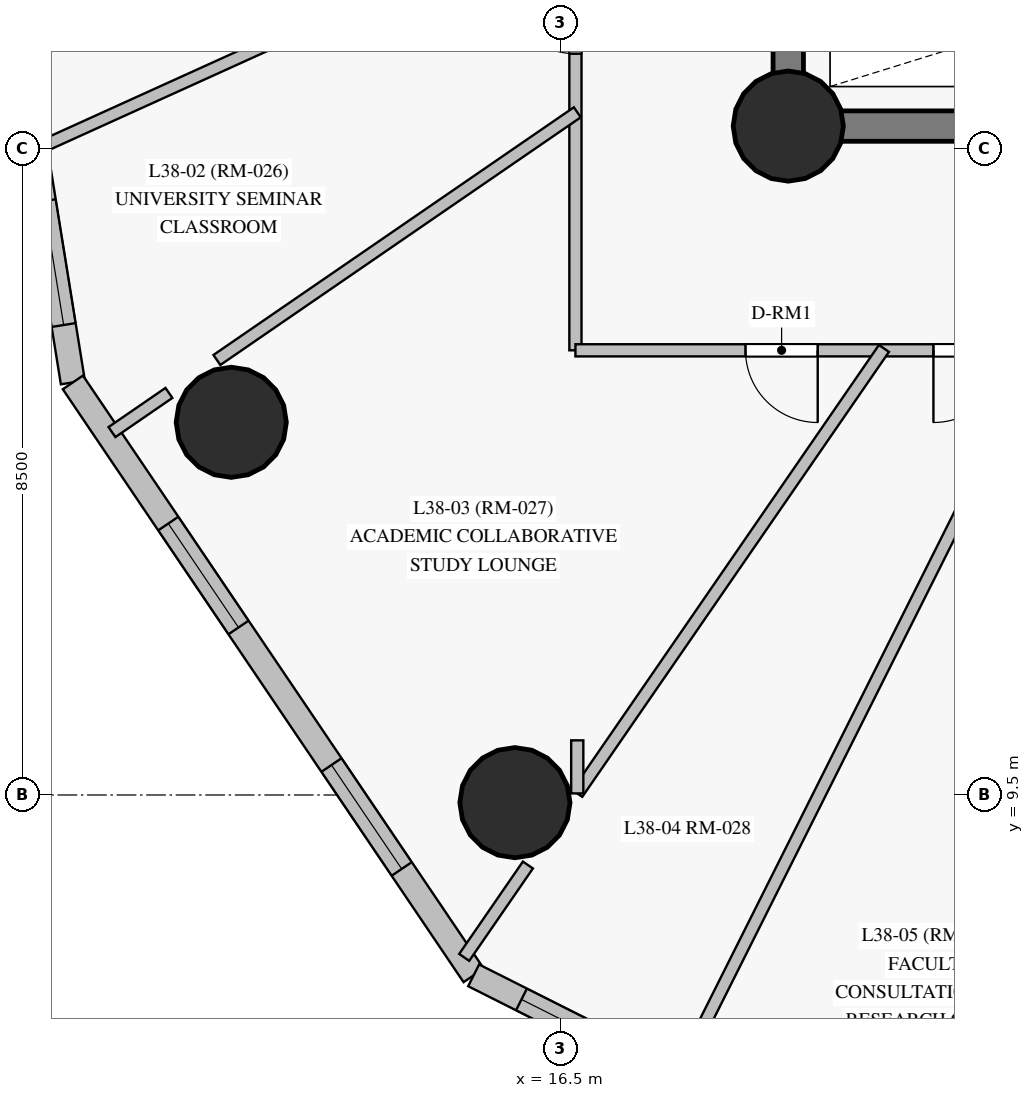
"""IFC4 building model, lengths in metres.
Left out: names, types, materials, properties, quantities, classifications, styles, units other than length and angle.
Written with IfcOpenShell. Run it as: python <this file> out.ifc"""

import sys

from ifc_helpers import new_model, si_unit, direction, frame, frame_2d, origin, origin_with_axes, origin_2d, place, context, subcontext, project, spatial, rectangle, circle, extrude, source, transform, mapped, element, fill, save


model = new_model("IFC4")
c1 = context("Model", 3, precision=1e-05, world=origin(), true_north=direction((0.0, 1.0)))
c2 = subcontext(c1, "Body", "Model", "MODEL_VIEW")
j1 = project(units=[si_unit("LENGTHUNIT", "METRE"), si_unit("PLANEANGLEUNIT", "RADIAN")], contexts=[c1])
p1 = place(None, origin())
s1 = spatial("IfcSite", under=j1, at=p1, CompositionType="ELEMENT")
p2 = place(p1, origin())
s2 = spatial("IfcBuilding", under=s1, at=p2, CompositionType="ELEMENT")
p3 = place(p2, frame((0.0, 0.0, 135.85)))
s3 = spatial("IfcBuildingStorey", under=s2, at=p3, CompositionType="ELEMENT", Elevation=135.85)
p4 = place(p3, frame((19.5, 18.3, 0.0), z_axis=(0.0, 0.0, 1.0), x_axis=(1.0, 0.0, 0.0)))
e1 = element("IfcWall", 1, at=p4, inside=s3, PredefinedType="SHEAR", context=c2, shape_type="SweptSolid", body=[
    extrude(rectangle(XDim=7.05, YDim=0.4, at=frame_2d((3.525, 0.0))), origin(), (0.0, 0.0, 1.0), 2.825),
])
p5 = place(p4, frame((4.2, 0.0, 0.0)))
e2 = element("IfcOpeningElement", 2, at=p5, cuts=e1, PredefinedType="OPENING", context=c2, shape_type="SweptSolid", body=[
    extrude(rectangle(XDim=1.4, YDim=2.2, at=frame_2d((0.7, 1.1))), frame((0.0, 0.21, 0.0), z_axis=(0.0, -1.0, 0.0), x_axis=(1.0, 0.0, 0.0)), (0.0, 0.0, 1.0), 0.42),
])
p6 = place(p3, frame((19.5, 34.7, 0.0), z_axis=(0.0, 0.0, 1.0), x_axis=(0.0, -1.0, 0.0)))
e3 = element("IfcWall", 3, at=p6, inside=s3, PredefinedType="SHEAR", context=c2, shape_type="SweptSolid", body=[
    extrude(rectangle(XDim=16.4, YDim=0.4, at=frame_2d((8.2, 0.0))), origin(), (0.0, 0.0, 1.0), 2.825),
])
p7 = place(p6, frame((3.1, 0.0, 0.0)))
e4 = element("IfcOpeningElement", 4, at=p7, cuts=e3, PredefinedType="OPENING", context=c2, shape_type="SweptSolid", body=[
    extrude(rectangle(XDim=1.1, YDim=2.15, at=frame_2d((0.55, 1.075))), frame((0.0, 0.21, 0.0), z_axis=(0.0, -1.0, 0.0), x_axis=(1.0, 0.0, 0.0)), (0.0, 0.0, 1.0), 0.42),
])
m1 = source(origin_with_axes(), c2, "Body", "SweptSolid", [
    extrude(circle(Radius=0.725, at=origin_2d()), origin(), (0.0, 0.0, 1.0), 3.05),
])
for number, where, z_axis, x_axis in (
    (5, (19.5, 18.3, 0.0), (0.0, 0.0, 1.0), (1.0, 0.0, 0.0)),
    (6, (12.172, 14.403, 0.0), (0.0, 0.0, 1.0), (1.0, 0.0, 0.0)),
    (7, (15.904, 9.399, 0.0), (0.0, 0.0, 1.0), (1.0, 0.0, 0.0)),
):
    element("IfcColumn", number, at=place(p3, frame(where, z_axis=z_axis, x_axis=x_axis)), inside=s3, PredefinedType="COLUMN", context=c2, shape_type="MappedRepresentation", body=[
        mapped(m1, transform((0.0, 0.0, 0.0), scale=1.0)),
    ])
p8 = place(p3, frame((7.924, 28.366, 0.0), z_axis=(0.0, 0.0, 1.0), x_axis=(0.159012496048, -0.987276570218, 0.0)))
e8 = element("IfcWall", 8, at=p8, inside=s3, PredefinedType="SOLIDWALL", context=c2, shape_type="SweptSolid", body=[
    extrude(rectangle(XDim=13.611, YDim=0.32, at=frame_2d((6.805, 0.0))), origin(), (0.0, 0.0, 1.0), 2.825),
])
p9 = place(p8, frame((0.856, 0.0, 0.85)))
e9 = element("IfcOpeningElement", 9, at=p9, cuts=e8, PredefinedType="OPENING", context=c2, shape_type="SweptSolid", body=[
    extrude(rectangle(XDim=1.65, YDim=1.65, at=frame_2d((0.825, 0.825))), frame((0.0, 0.17, 0.0), z_axis=(0.0, -1.0, 0.0), x_axis=(1.0, 0.0, 0.0)), (0.0, 0.0, 1.0), 0.34),
])
p10 = place(p8, frame((6.072, 0.0, 0.85)))
e10 = element("IfcOpeningElement", 10, at=p10, cuts=e8, PredefinedType="OPENING", context=c2, shape_type="SweptSolid", body=[
    extrude(rectangle(XDim=1.65, YDim=1.65, at=frame_2d((0.825, 0.825))), frame((0.0, 0.17, 0.0), z_axis=(0.0, -1.0, 0.0), x_axis=(1.0, 0.0, 0.0)), (0.0, 0.0, 1.0), 0.34),
])
p11 = place(p8, frame((11.196, 0.0, 0.85)))
e11 = element("IfcOpeningElement", 11, at=p11, cuts=e8, PredefinedType="OPENING", context=c2, shape_type="SweptSolid", body=[
    extrude(rectangle(XDim=1.65, YDim=1.65, at=frame_2d((0.825, 0.825))), frame((0.0, 0.17, 0.0), z_axis=(0.0, -1.0, 0.0), x_axis=(1.0, 0.0, 0.0)), (0.0, 0.0, 1.0), 0.34),
])
p12 = place(p3, frame((10.088, 14.928, 0.0), z_axis=(0.0, 0.0, 1.0), x_axis=(0.559978653474, -0.828507035368, 0.0)))
e12 = element("IfcWall", 12, at=p12, inside=s3, PredefinedType="SOLIDWALL", context=c2, shape_type="SweptSolid", body=[
    extrude(rectangle(XDim=9.416, YDim=0.32, at=frame_2d((4.708, 0.0))), origin(), (0.0, 0.0, 1.0), 2.825),
])
p13 = place(p12, frame((2.241, 0.0, 0.85)))
e13 = element("IfcOpeningElement", 13, at=p13, cuts=e12, PredefinedType="OPENING", context=c2, shape_type="SweptSolid", body=[
    extrude(rectangle(XDim=1.65, YDim=1.65, at=frame_2d((0.825, 0.825))), frame((0.0, 0.17, 0.0), z_axis=(0.0, -1.0, 0.0), x_axis=(1.0, 0.0, 0.0)), (0.0, 0.0, 1.0), 0.34),
])
p14 = place(p12, frame((6.076, 0.0, 0.85)))
e14 = element("IfcOpeningElement", 14, at=p14, cuts=e12, PredefinedType="OPENING", context=c2, shape_type="SweptSolid", body=[
    extrude(rectangle(XDim=1.65, YDim=1.65, at=frame_2d((0.825, 0.825))), frame((0.0, 0.17, 0.0), z_axis=(0.0, -1.0, 0.0), x_axis=(1.0, 0.0, 0.0)), (0.0, 0.0, 1.0), 0.34),
])
p15 = place(p3, frame((15.361, 7.127, 0.0), z_axis=(0.0, 0.0, 1.0), x_axis=(0.893242675261, -0.449574824798, 0.0)))
e15 = element("IfcWall", 15, at=p15, inside=s3, PredefinedType="SOLIDWALL", context=c2, shape_type="SweptSolid", body=[
    extrude(rectangle(XDim=11.738, YDim=0.32, at=frame_2d((5.869, 0.0))), origin(), (0.0, 0.0, 1.0), 2.825),
])
p16 = place(p15, frame((0.705, 0.0, 0.85)))
e16 = element("IfcOpeningElement", 16, at=p16, cuts=e15, PredefinedType="OPENING", context=c2, shape_type="SweptSolid", body=[
    extrude(rectangle(XDim=1.65, YDim=1.65, at=frame_2d((0.825, 0.825))), frame((0.0, 0.17, 0.0), z_axis=(0.0, -1.0, 0.0), x_axis=(1.0, 0.0, 0.0)), (0.0, 0.0, 1.0), 0.34),
])
p17 = place(p15, frame((4.848, 0.0, 0.85)))
e17 = element("IfcOpeningElement", 17, at=p17, cuts=e15, PredefinedType="OPENING", context=c2, shape_type="SweptSolid", body=[
    extrude(rectangle(XDim=1.65, YDim=1.65, at=frame_2d((0.825, 0.825))), frame((0.0, 0.17, 0.0), z_axis=(0.0, -1.0, 0.0), x_axis=(1.0, 0.0, 0.0)), (0.0, 0.0, 1.0), 0.34),
])
p18 = place(p15, frame((9.188, 0.0, 0.85)))
e18 = element("IfcOpeningElement", 18, at=p18, cuts=e15, PredefinedType="OPENING", context=c2, shape_type="SweptSolid", body=[
    extrude(rectangle(XDim=1.65, YDim=1.65, at=frame_2d((0.825, 0.825))), frame((0.0, 0.17, 0.0), z_axis=(0.0, -1.0, 0.0), x_axis=(1.0, 0.0, 0.0)), (0.0, 0.0, 1.0), 0.34),
])
p19 = place(p3, frame((16.7, 15.35, 0.0), z_axis=(0.0, 0.0, 1.0), x_axis=(0.0, 1.0, 0.0)))
e19 = element("IfcWall", 19, at=p19, inside=s3, PredefinedType="PARTITIONING", context=c2, shape_type="SweptSolid", body=[
    extrude(rectangle(XDim=22.3, YDim=0.16, at=frame_2d((11.15, 0.0))), origin(), (0.0, 0.0, 1.0), 2.225),
])
p20 = place(p19, frame((7.33, 0.0, 0.0)))
e20 = element("IfcOpeningElement", 20, at=p20, cuts=e19, PredefinedType="OPENING", context=c2, shape_type="SweptSolid", body=[
    extrude(rectangle(XDim=0.95, YDim=2.15, at=frame_2d((0.475, 1.075))), frame((0.0, 0.09, 0.0), z_axis=(0.0, -1.0, 0.0), x_axis=(1.0, 0.0, 0.0)), (0.0, 0.0, 1.0), 0.18),
])
p21 = place(p19, frame((3.903, 0.0, 0.0)))
e21 = element("IfcOpeningElement", 21, at=p21, cuts=e19, PredefinedType="OPENING", context=c2, shape_type="SweptSolid", body=[
    extrude(rectangle(XDim=0.96, YDim=2.15, at=frame_2d((0.48, 1.075))), frame((0.0, 0.09, 0.0), z_axis=(0.0, -1.0, 0.0), x_axis=(1.0, 0.0, 0.0)), (0.0, 0.0, 1.0), 0.18),
])
p22 = place(p19, frame((18.341, 0.0, 0.0)))
e22 = element("IfcOpeningElement", 22, at=p22, cuts=e19, PredefinedType="OPENING", context=c2, shape_type="SweptSolid", body=[
    extrude(rectangle(XDim=0.95, YDim=2.15, at=frame_2d((0.475, 1.075))), frame((0.0, 0.09, 0.0), z_axis=(0.0, -1.0, 0.0), x_axis=(1.0, 0.0, 0.0)), (0.0, 0.0, 1.0), 0.18),
])
p23 = place(p19, frame((14.02, 0.0, 0.0)))
e23 = element("IfcOpeningElement", 23, at=p23, cuts=e19, PredefinedType="OPENING", context=c2, shape_type="SweptSolid", body=[
    extrude(rectangle(XDim=0.95, YDim=2.15, at=frame_2d((0.475, 1.075))), frame((0.0, 0.09, 0.0), z_axis=(0.0, -1.0, 0.0), x_axis=(1.0, 0.0, 0.0)), (0.0, 0.0, 1.0), 0.18),
])
p24 = place(p19, frame((10.675, 0.0, 0.0)))
e24 = element("IfcOpeningElement", 24, at=p24, cuts=e19, PredefinedType="OPENING", context=c2, shape_type="SweptSolid", body=[
    extrude(rectangle(XDim=0.95, YDim=2.15, at=frame_2d((0.475, 1.075))), frame((0.0, 0.09, 0.0), z_axis=(0.0, -1.0, 0.0), x_axis=(1.0, 0.0, 0.0)), (0.0, 0.0, 1.0), 0.18),
])
p25 = place(p3, frame((27.55, 15.35, 0.0), z_axis=(0.0, 0.0, 1.0), x_axis=(-1.0, 0.0, 0.0)))
e25 = element("IfcWall", 25, at=p25, inside=s3, PredefinedType="PARTITIONING", context=c2, shape_type="SweptSolid", body=[
    extrude(rectangle(XDim=10.85, YDim=0.16, at=frame_2d((5.425, 0.0))), origin(), (0.0, 0.0, 1.0), 2.325),
])
p26 = place(p25, frame((7.663, 0.0, 0.0)))
e26 = element("IfcOpeningElement", 26, at=p26, cuts=e25, PredefinedType="OPENING", context=c2, shape_type="SweptSolid", body=[
    extrude(rectangle(XDim=0.95, YDim=2.15, at=frame_2d((0.475, 1.075))), frame((0.0, 0.09, 0.0), z_axis=(0.0, -1.0, 0.0), x_axis=(1.0, 0.0, 0.0)), (0.0, 0.0, 1.0), 0.18),
])
p27 = place(p25, frame((5.19, 0.0, 0.0)))
e27 = element("IfcOpeningElement", 27, at=p27, cuts=e25, PredefinedType="OPENING", context=c2, shape_type="SweptSolid", body=[
    extrude(rectangle(XDim=0.95, YDim=2.15, at=frame_2d((0.475, 1.075))), frame((0.0, 0.09, 0.0), z_axis=(0.0, -1.0, 0.0), x_axis=(1.0, 0.0, 0.0)), (0.0, 0.0, 1.0), 0.18),
])
p28 = place(p25, frame((3.323, 0.0, 0.0)))
e28 = element("IfcOpeningElement", 28, at=p28, cuts=e25, PredefinedType="OPENING", context=c2, shape_type="SweptSolid", body=[
    extrude(rectangle(XDim=0.95, YDim=2.15, at=frame_2d((0.475, 1.075))), frame((0.0, 0.09, 0.0), z_axis=(0.0, -1.0, 0.0), x_axis=(1.0, 0.0, 0.0)), (0.0, 0.0, 1.0), 0.18),
])
p29 = place(p25, frame((0.535, 0.0, 0.0)))
e29 = element("IfcOpeningElement", 29, at=p29, cuts=e25, PredefinedType="OPENING", context=c2, shape_type="SweptSolid", body=[
    extrude(rectangle(XDim=0.86, YDim=2.1, at=frame_2d((0.43, 1.05))), frame((0.0, 0.09, 0.0), z_axis=(0.0, -1.0, 0.0), x_axis=(1.0, 0.0, 0.0)), (0.0, 0.0, 1.0), 0.18),
])
p30 = place(p3, frame((22.854, 15.377, 0.0), z_axis=(0.0, 0.0, 1.0), x_axis=(-0.448325403078, -0.893870422911, 0.0)))
e30 = element("IfcWall", 30, at=p30, inside=s3, PredefinedType="PARTITIONING", context=c2, shape_type="SweptSolid", body=[
    extrude(rectangle(XDim=10.713, YDim=0.16, at=frame_2d((5.356, 0.0))), origin(), (0.0, 0.0, 1.0), 2.825),
])
p31 = place(p3, frame((16.727, 21.226, 0.0), z_axis=(0.0, 0.0, 1.0), x_axis=(-0.910695129443, -0.413079146422, 0.0)))
e31 = element("IfcWall", 31, at=p31, inside=s3, PredefinedType="PARTITIONING", context=c2, shape_type="SweptSolid", body=[
    extrude(rectangle(XDim=7.803, YDim=0.16, at=frame_2d((3.902, 0.0))), origin(), (0.0, 0.0, 1.0), 2.825),
])
p32 = place(p3, frame((20.759, 15.375, 0.0), z_axis=(0.0, 0.0, 1.0), x_axis=(-0.567487382716, -0.823382092627, 0.0)))
e32 = element("IfcWall", 32, at=p32, inside=s3, PredefinedType="PARTITIONING", context=c2, shape_type="SweptSolid", body=[
    extrude(rectangle(XDim=7.11, YDim=0.16, at=frame_2d((3.555, 0.0))), origin(), (0.0, 0.0, 1.0), 2.825),
])
p33 = place(p3, frame((16.725, 18.481, 0.0), z_axis=(0.0, 0.0, 1.0), x_axis=(-0.8241595355, -0.566357713856, 0.0)))
e33 = element("IfcWall", 33, at=p33, inside=s3, PredefinedType="PARTITIONING", context=c2, shape_type="SweptSolid", body=[
    extrude(rectangle(XDim=5.753, YDim=0.16, at=frame_2d((2.876, 0.0))), origin(), (0.0, 0.0, 1.0), 2.825),
])
p34 = place(p3, frame((16.075, 8.579, 0.0), z_axis=(0.0, 0.0, 1.0), x_axis=(-0.567566818145, -0.823327338876, 0.0)))
e34 = element("IfcWall", 34, at=p34, inside=s3, PredefinedType="PARTITIONING", context=c2, shape_type="SweptSolid", body=[
    extrude(rectangle(XDim=1.477, YDim=0.16, at=frame_2d((0.738, 0.0))), origin(), (0.0, 0.0, 1.0), 2.825),
])
p35 = place(p3, frame((11.352, 14.789, 0.0), z_axis=(0.0, 0.0, 1.0), x_axis=(-0.82424554838, -0.566232528186, 0.0)))
e35 = element("IfcWall", 35, at=p35, inside=s3, PredefinedType="PARTITIONING", context=c2, shape_type="SweptSolid", body=[
    extrude(rectangle(XDim=0.909, YDim=0.16, at=frame_2d((0.455, 0.0))), origin(), (0.0, 0.0, 1.0), 2.825),
])
p36 = place(p3, frame((16.724, 9.521, 0.0), z_axis=(0.0, 0.0, 1.0), x_axis=(0.0, 1.0, 0.0)))
e36 = element("IfcWall", 36, at=p36, inside=s3, PredefinedType="PARTITIONING", context=c2, shape_type="SweptSolid", body=[
    extrude(rectangle(XDim=0.698, YDim=0.16, at=frame_2d((0.349, 0.0))), origin(), (0.0, 0.0, 1.0), 2.225),
])
m2 = source(origin_with_axes(), c2, "Body", "SweptSolid", [
    extrude(rectangle(XDim=1.65, YDim=1.65, at=frame_2d((0.825, 0.825))), frame((0.0, 0.03, 0.0), z_axis=(0.0, -1.0, 0.0), x_axis=(1.0, 0.0, 0.0)), (0.0, 0.0, 1.0), 0.06),
])
p37 = place(p11, origin())
e37 = element("IfcWindow", 37, at=p37, inside=s3, PartitioningType="SINGLE_PANEL", PredefinedType="WINDOW", context=c2, shape_type="MappedRepresentation", body=[
    mapped(m2, transform((0.0, 0.0, 0.0), scale=1.0)),
])
fill(e11, e37)
p38 = place(p13, origin())
e38 = element("IfcWindow", 38, at=p38, inside=s3, PartitioningType="SINGLE_PANEL", PredefinedType="WINDOW", context=c2, shape_type="MappedRepresentation", body=[
    mapped(m2, transform((0.0, 0.0, 0.0), scale=1.0)),
])
fill(e13, e38)
p39 = place(p14, origin())
e39 = element("IfcWindow", 39, at=p39, inside=s3, PartitioningType="SINGLE_PANEL", PredefinedType="WINDOW", context=c2, shape_type="MappedRepresentation", body=[
    mapped(m2, transform((0.0, 0.0, 0.0), scale=1.0)),
])
fill(e14, e39)
p40 = place(p16, origin())
e40 = element("IfcWindow", 40, at=p40, inside=s3, PartitioningType="SINGLE_PANEL", PredefinedType="WINDOW", context=c2, shape_type="MappedRepresentation", body=[
    mapped(m2, transform((0.0, 0.0, 0.0), scale=1.0)),
])
fill(e16, e40)
m3 = source(origin_with_axes(), c2, "Body", "SweptSolid", [
    extrude(rectangle(XDim=0.96, YDim=2.15, at=frame_2d((0.48, 1.075))), frame((0.0, 0.025, 0.0), z_axis=(0.0, -1.0, 0.0), x_axis=(1.0, 0.0, 0.0)), (0.0, 0.0, 1.0), 0.05),
])
p41 = place(p21, origin())
e41 = element("IfcDoor", 41, at=p41, inside=s3, OperationType="SINGLE_SWING_RIGHT", PredefinedType="DOOR", context=c2, shape_type="MappedRepresentation", body=[
    mapped(m3, transform((0.0, 0.0, 0.0), scale=1.0)),
])
fill(e21, e41)
m4 = source(origin_with_axes(), c2, "Body", "SweptSolid", [
    extrude(rectangle(XDim=0.95, YDim=2.15, at=frame_2d((0.475, 1.075))), frame((0.0, 0.025, 0.0), z_axis=(0.0, -1.0, 0.0), x_axis=(1.0, 0.0, 0.0)), (0.0, 0.0, 1.0), 0.05),
])
p42 = place(p26, origin())
e42 = element("IfcDoor", 42, at=p42, inside=s3, OperationType="SINGLE_SWING_LEFT", PredefinedType="DOOR", context=c2, shape_type="MappedRepresentation", body=[
    mapped(m4, transform((0.0, 0.0, 0.0), scale=1.0)),
])
fill(e26, e42)
p43 = place(p27, origin())
e43 = element("IfcDoor", 43, at=p43, inside=s3, OperationType="SINGLE_SWING_RIGHT", PredefinedType="DOOR", context=c2, shape_type="MappedRepresentation", body=[
    mapped(m4, transform((0.0, 0.0, 0.0), scale=1.0)),
])
fill(e27, e43)
save(model, sys.argv[1])
